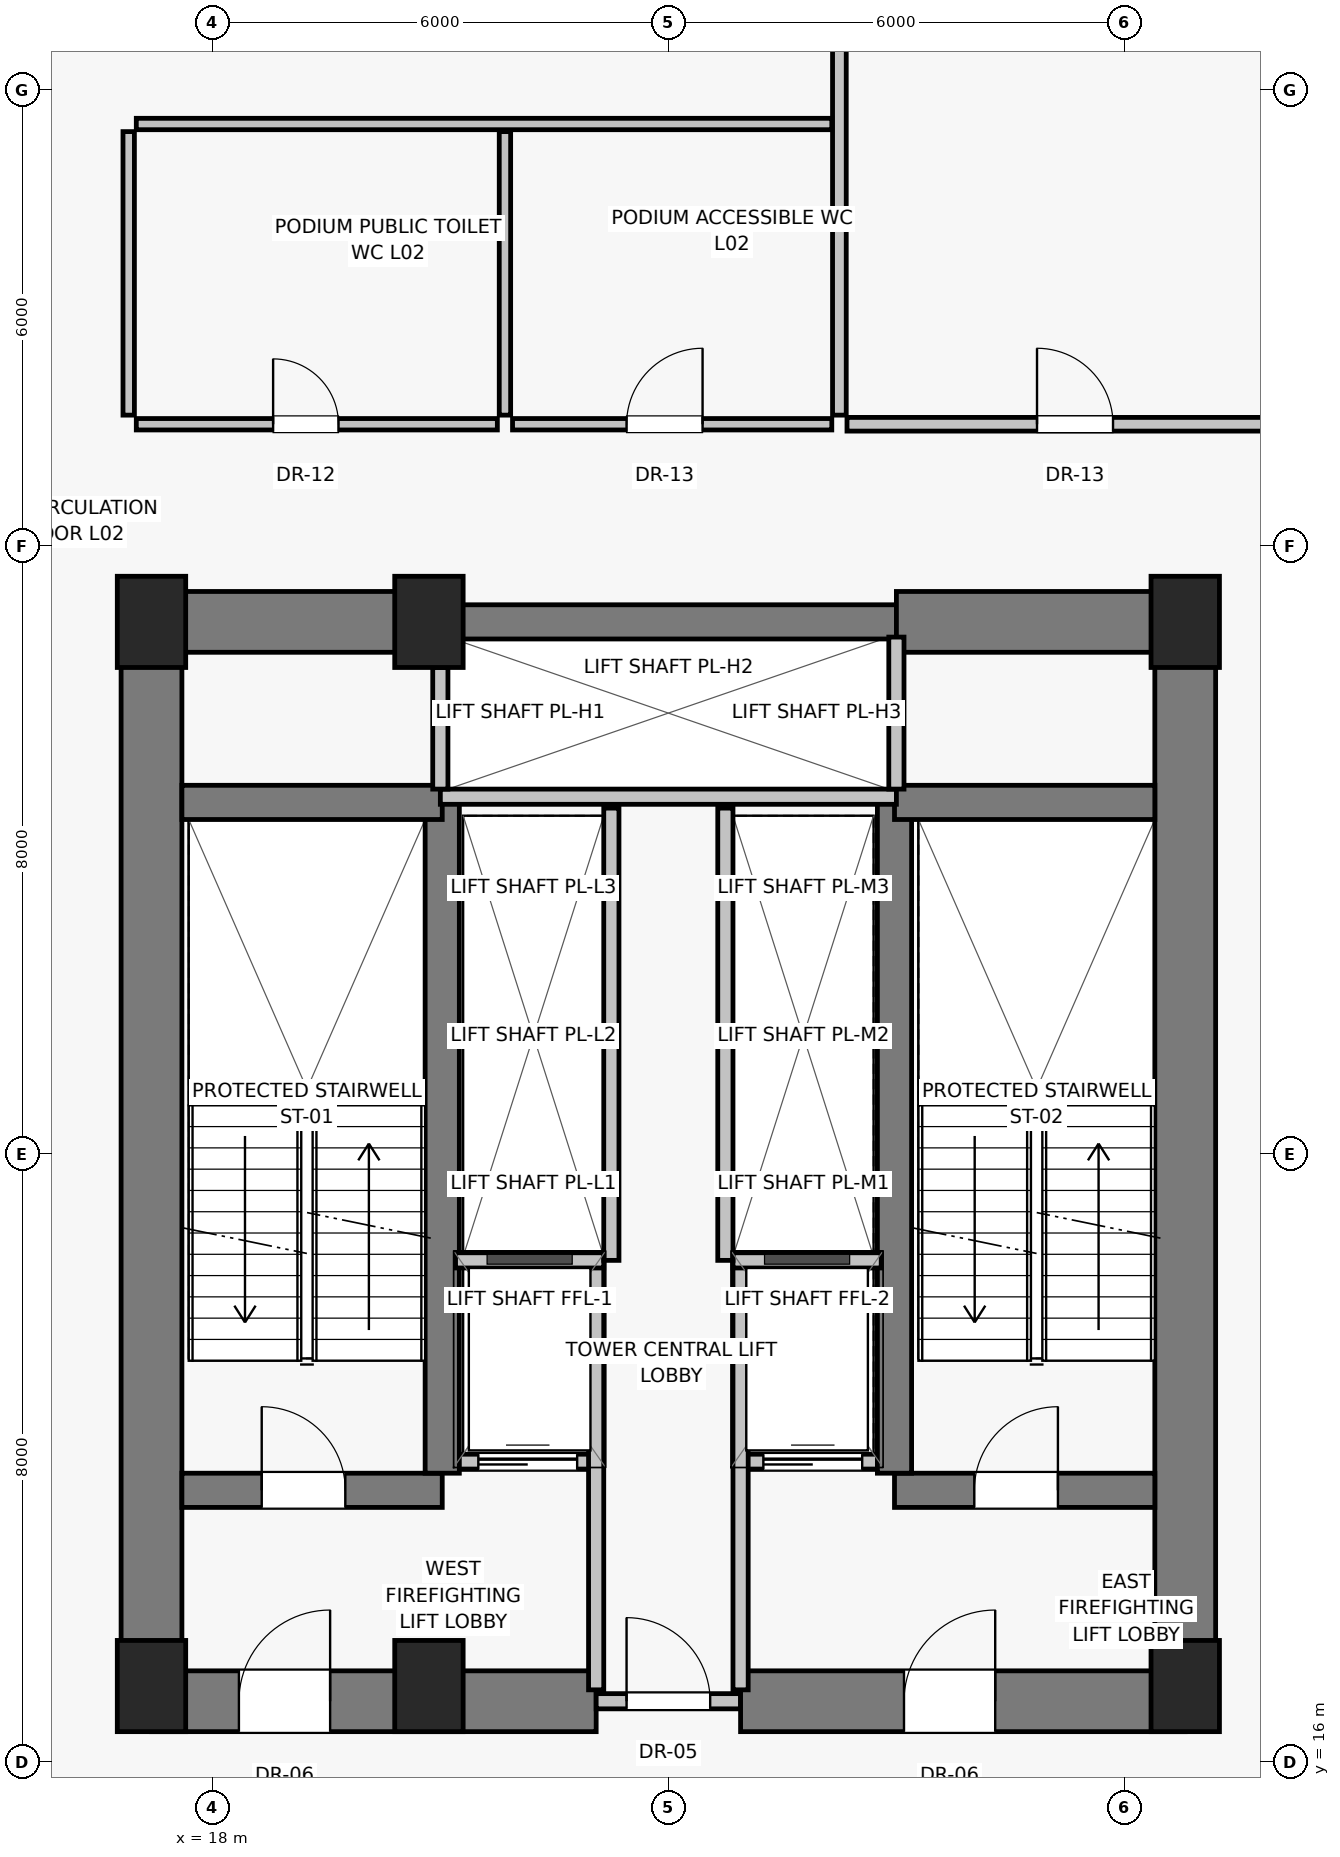
"""IFC4 building model, lengths in metres.
Left out: names, types, materials, properties, quantities, classifications, styles, units other than length and angle.
Written with IfcOpenShell. Run it as: python <this file> out.ifc"""

import sys

from ifc_helpers import new_model, si_unit, direction, frame, frame_2d, origin, origin_2d, place, context, subcontext, project, spatial, rectangle, extrude, source, transform, mapped, element, fill, save


model = new_model("IFC4")
c1 = context("Model", 3, precision=1e-05, world=origin(), true_north=direction((0.0, 1.0)))
c2 = subcontext(c1, "Body", "Model", "MODEL_VIEW")
j1 = project(units=[si_unit("LENGTHUNIT", "METRE"), si_unit("PLANEANGLEUNIT", "RADIAN")], contexts=[c1])
p1 = place(None, origin())
s1 = spatial("IfcSite", under=j1, at=p1, CompositionType="ELEMENT")
p2 = place(p1, origin())
s2 = spatial("IfcBuilding", under=s1, at=p2, CompositionType="ELEMENT")
p3 = place(p2, frame((0.0, 0.0, 9.6)))
s3 = spatial("IfcBuildingStorey", under=s2, at=p3, CompositionType="ELEMENT", Elevation=9.6)
for number, where, z_axis, x_axis in (
    (1, (17.2, 17.0, 0.0), (0.0, 0.0, 1.0), (1.0, 0.0, 0.0)),
    (2, (20.85, 17.0, 0.0), (0.0, 0.0, 1.0), (1.0, 0.0, 0.0)),
    (3, (30.8, 17.0, 0.0), (0.0, 0.0, 1.0), (1.0, 0.0, 0.0)),
    (4, (17.2, 31.0, 0.0), (0.0, 0.0, 1.0), (1.0, 0.0, 0.0)),
    (5, (20.85, 31.0, 0.0), (0.0, 0.0, 1.0), (1.0, 0.0, 0.0)),
    (6, (30.8, 31.0, 0.0), (0.0, 0.0, 1.0), (1.0, 0.0, 0.0)),
):
    element("IfcColumn", number, at=place(p3, frame(where, z_axis=z_axis, x_axis=x_axis)), inside=s3, PredefinedType="PILASTER", context=c2, shape_type="SweptSolid", body=[
        extrude(rectangle(XDim=0.9, YDim=1.2, at=origin_2d()), origin(), (0.0, 0.0, 1.0), 4.4),
    ])
for number, where, z_axis, x_axis in (
    (7, (17.2, 16.8, 0.0), (0.0, 0.0, 1.0), (0.0, 1.0, 0.0)),
    (8, (30.8, 16.8, 0.0), (0.0, 0.0, 1.0), (0.0, 1.0, 0.0)),
):
    element("IfcWall", number, at=place(p3, frame(where, z_axis=z_axis, x_axis=x_axis)), inside=s3, PredefinedType="SHEAR", context=c2, shape_type="SweptSolid", body=[
        extrude(rectangle(XDim=14.2, YDim=0.8, at=frame_2d((7.1, 0.0))), origin(), (0.0, 0.0, 1.0), 4.1),
    ])
p4 = place(p3, frame((17.2, 16.8, 0.0), z_axis=(0.0, 0.0, 1.0), x_axis=(1.0, 0.0, 0.0)))
e9 = element("IfcWall", 9, at=p4, inside=s3, PredefinedType="SHEAR", context=c2, shape_type="SweptSolid", body=[
    extrude(rectangle(XDim=5.85, YDim=0.8, at=frame_2d((2.925, 0.0))), origin(), (0.0, 0.0, 1.0), 4.1),
])
p5 = place(p4, frame((1.15, 0.0, 0.0)))
e10 = element("IfcOpeningElement", 10, at=p5, cuts=e9, PredefinedType="OPENING", context=c2, shape_type="SweptSolid", body=[
    extrude(rectangle(XDim=1.2, YDim=2.03, at=frame_2d((0.6, 1.015))), frame((0.0, 0.41, 0.0), z_axis=(0.0, -1.0, 0.0), x_axis=(1.0, 0.0, 0.0)), (0.0, 0.0, 1.0), 0.82),
])
p6 = place(p3, frame((23.05, 16.8, 0.0), z_axis=(0.0, 0.0, 1.0), x_axis=(1.0, 0.0, 0.0)))
e11 = element("IfcWall", 11, at=p6, inside=s3, PredefinedType="SOLIDWALL", context=c2, shape_type="SweptSolid", body=[
    extrude(rectangle(XDim=1.9, YDim=0.2, at=frame_2d((0.95, 0.0))), origin(), (0.0, 0.0, 1.0), 3.25),
])
p7 = place(p6, frame((0.4, 0.0, 0.0)))
e12 = element("IfcOpeningElement", 12, at=p7, cuts=e11, PredefinedType="OPENING", context=c2, shape_type="SweptSolid", body=[
    extrude(rectangle(XDim=1.1, YDim=2.03, at=frame_2d((0.55, 1.015))), frame((0.0, 0.11, 0.0), z_axis=(0.0, -1.0, 0.0), x_axis=(1.0, 0.0, 0.0)), (0.0, 0.0, 1.0), 0.22),
])
p8 = place(p3, frame((24.95, 16.8, 0.0), z_axis=(0.0, 0.0, 1.0), x_axis=(1.0, 0.0, 0.0)))
e13 = element("IfcWall", 13, at=p8, inside=s3, PredefinedType="SHEAR", context=c2, shape_type="SweptSolid", body=[
    extrude(rectangle(XDim=5.85, YDim=0.8, at=frame_2d((2.925, 0.0))), origin(), (0.0, 0.0, 1.0), 4.1),
])
p9 = place(p8, frame((2.15, 0.0, 0.0)))
e14 = element("IfcOpeningElement", 14, at=p9, cuts=e13, PredefinedType="OPENING", context=c2, shape_type="SweptSolid", body=[
    extrude(rectangle(XDim=1.2, YDim=2.03, at=frame_2d((0.6, 1.015))), frame((0.0, 0.41, 0.0), z_axis=(0.0, -1.0, 0.0), x_axis=(1.0, 0.0, 0.0)), (0.0, 0.0, 1.0), 0.82),
])
p10 = place(p3, frame((17.2, 31.0, 0.0), z_axis=(0.0, 0.0, 1.0), x_axis=(1.0, 0.0, 0.0)))
e15 = element("IfcWall", 15, at=p10, inside=s3, PredefinedType="SHEAR", context=c2, shape_type="SweptSolid", body=[
    extrude(rectangle(XDim=3.8, YDim=0.8, at=frame_2d((1.9, 0.0))), origin(), (0.0, 0.0, 1.0), 4.1),
])
p11 = place(p3, frame((21.0, 31.0, 0.0), z_axis=(0.0, 0.0, 1.0), x_axis=(1.0, 0.0, 0.0)))
e16 = element("IfcWall", 16, at=p11, inside=s3, PredefinedType="SHEAR", context=c2, shape_type="SweptSolid", body=[
    extrude(rectangle(XDim=6.0, YDim=0.45, at=frame_2d((3.0, 0.0))), origin(), (0.0, 0.0, 1.0), 4.1),
])
p12 = place(p3, frame((27.0, 31.0, 0.0), z_axis=(0.0, 0.0, 1.0), x_axis=(1.0, 0.0, 0.0)))
e17 = element("IfcWall", 17, at=p12, inside=s3, PredefinedType="SHEAR", context=c2, shape_type="SweptSolid", body=[
    extrude(rectangle(XDim=3.8, YDim=0.8, at=frame_2d((1.9, 0.0))), origin(), (0.0, 0.0, 1.0), 4.1),
])
p13 = place(p3, frame((17.6, 19.575, 0.0), z_axis=(0.0, 0.0, 1.0), x_axis=(1.0, 0.0, 0.0)))
e18 = element("IfcWall", 18, at=p13, inside=s3, PredefinedType="SHEAR", context=c2, shape_type="SweptSolid", body=[
    extrude(rectangle(XDim=3.425, YDim=0.45, at=frame_2d((1.712, 0.0))), origin(), (0.0, 0.0, 1.0), 4.1),
])
p14 = place(p13, frame((1.05, 0.0, 0.0)))
e19 = element("IfcOpeningElement", 19, at=p14, cuts=e18, PredefinedType="OPENING", context=c2, shape_type="SweptSolid", body=[
    extrude(rectangle(XDim=1.1, YDim=2.03, at=frame_2d((0.55, 1.015))), frame((0.0, 0.235, 0.0), z_axis=(0.0, -1.0, 0.0), x_axis=(1.0, 0.0, 0.0)), (0.0, 0.0, 1.0), 0.47),
])
p15 = place(p3, frame((21.2, 19.95, 0.0), z_axis=(0.0, 0.0, 1.0), x_axis=(1.0, 0.0, 0.0)))
e20 = element("IfcWall", 20, at=p15, inside=s3, PredefinedType="SOLIDWALL", context=c2, shape_type="SweptSolid", body=[
    extrude(rectangle(XDim=1.85, YDim=0.2, at=frame_2d((0.925, 0.0))), origin(), (0.0, 0.0, 1.0), 4.1),
])
p16 = place(p15, frame((0.3, 0.0, 0.0)))
e21 = element("IfcOpeningElement", 21, at=p16, cuts=e20, PredefinedType="OPENING", context=c2, shape_type="SweptSolid", body=[
    extrude(rectangle(XDim=1.3, YDim=2.25, at=frame_2d((0.65, 1.125))), frame((0.0, 0.11, 0.0), z_axis=(0.0, -1.0, 0.0), x_axis=(1.0, 0.0, 0.0)), (0.0, 0.0, 1.0), 0.22),
])
p17 = place(p3, frame((24.95, 19.95, 0.0), z_axis=(0.0, 0.0, 1.0), x_axis=(1.0, 0.0, 0.0)))
e22 = element("IfcWall", 22, at=p17, inside=s3, PredefinedType="SOLIDWALL", context=c2, shape_type="SweptSolid", body=[
    extrude(rectangle(XDim=1.85, YDim=0.2, at=frame_2d((0.925, 0.0))), origin(), (0.0, 0.0, 1.0), 4.1),
])
p18 = place(p17, frame((0.3, 0.0, 0.0)))
e23 = element("IfcOpeningElement", 23, at=p18, cuts=e22, PredefinedType="OPENING", context=c2, shape_type="SweptSolid", body=[
    extrude(rectangle(XDim=1.3, YDim=2.25, at=frame_2d((0.65, 1.125))), frame((0.0, 0.11, 0.0), z_axis=(0.0, -1.0, 0.0), x_axis=(1.0, 0.0, 0.0)), (0.0, 0.0, 1.0), 0.22),
])
p19 = place(p3, frame((26.975, 19.575, 0.0), z_axis=(0.0, 0.0, 1.0), x_axis=(1.0, 0.0, 0.0)))
e24 = element("IfcWall", 24, at=p19, inside=s3, PredefinedType="SHEAR", context=c2, shape_type="SweptSolid", body=[
    extrude(rectangle(XDim=3.425, YDim=0.45, at=frame_2d((1.712, 0.0))), origin(), (0.0, 0.0, 1.0), 4.1),
])
p20 = place(p19, frame((1.05, 0.0, 0.0)))
e25 = element("IfcOpeningElement", 25, at=p20, cuts=e24, PredefinedType="OPENING", context=c2, shape_type="SweptSolid", body=[
    extrude(rectangle(XDim=1.1, YDim=2.03, at=frame_2d((0.55, 1.015))), frame((0.0, 0.235, 0.0), z_axis=(0.0, -1.0, 0.0), x_axis=(1.0, 0.0, 0.0)), (0.0, 0.0, 1.0), 0.47),
])
for number, where, z_axis, x_axis in (
    (26, (21.025, 19.8, 0.0), (0.0, 0.0, 1.0), (0.0, 1.0, 0.0)),
    (27, (26.975, 19.8, 0.0), (0.0, 0.0, 1.0), (0.0, 1.0, 0.0)),
):
    element("IfcWall", number, at=place(p3, frame(where, z_axis=z_axis, x_axis=x_axis)), inside=s3, PredefinedType="SHEAR", context=c2, shape_type="SweptSolid", body=[
        extrude(rectangle(XDim=8.825, YDim=0.45, at=frame_2d((4.413, 0.0))), origin(), (0.0, 0.0, 1.0), 4.1),
    ])
for number, where, z_axis, x_axis in (
    (28, (17.6, 28.625, 0.0), (0.0, 0.0, 1.0), (1.0, 0.0, 0.0)),
    (29, (26.975, 28.625, 0.0), (0.0, 0.0, 1.0), (1.0, 0.0, 0.0)),
):
    element("IfcWall", number, at=place(p3, frame(where, z_axis=z_axis, x_axis=x_axis)), inside=s3, PredefinedType="SHEAR", context=c2, shape_type="SweptSolid", body=[
        extrude(rectangle(XDim=3.425, YDim=0.45, at=frame_2d((1.712, 0.0))), origin(), (0.0, 0.0, 1.0), 4.1),
    ])
for number, where, z_axis, x_axis in (
    (30, (23.05, 16.95, 0.0), (0.0, 0.0, 1.0), (0.0, 1.0, 0.0)),
    (31, (24.95, 16.95, 0.0), (0.0, 0.0, 1.0), (0.0, 1.0, 0.0)),
):
    element("IfcWall", number, at=place(p3, frame(where, z_axis=z_axis, x_axis=x_axis)), inside=s3, PredefinedType="SOLIDWALL", context=c2, shape_type="SweptSolid", body=[
        extrude(rectangle(XDim=5.6, YDim=0.2, at=frame_2d((2.8, 0.0))), origin(), (0.0, 0.0, 1.0), 4.1),
    ])
for number, where, z_axis, x_axis in (
    (32, (21.2, 22.6, 0.0), (0.0, 0.0, 1.0), (1.0, 0.0, 0.0)),
    (33, (24.85, 22.6, 0.0), (0.0, 0.0, 1.0), (1.0, 0.0, 0.0)),
):
    element("IfcWall", number, at=place(p3, frame(where, z_axis=z_axis, x_axis=x_axis)), inside=s3, PredefinedType="SOLIDWALL", context=c2, shape_type="SweptSolid", body=[
        extrude(rectangle(XDim=1.95, YDim=0.2, at=frame_2d((0.975, 0.0))), origin(), (0.0, 0.0, 1.0), 4.1),
    ])
p21 = place(p3, frame((21.0, 28.7, 0.0), z_axis=(0.0, 0.0, 1.0), x_axis=(1.0, 0.0, 0.0)))
e34 = element("IfcWall", 34, at=p21, inside=s3, PredefinedType="SOLIDWALL", context=c2, shape_type="SweptSolid", body=[
    extrude(rectangle(XDim=6.0, YDim=0.2, at=frame_2d((3.0, 0.0))), origin(), (0.0, 0.0, 1.0), 4.1),
])
p22 = place(p3, frame((21.0, 28.8, 0.0), z_axis=(0.0, 0.0, 1.0), x_axis=(0.0, 1.0, 0.0)))
e35 = element("IfcWall", 35, at=p22, inside=s3, PredefinedType="SOLIDWALL", context=c2, shape_type="SweptSolid", body=[
    extrude(rectangle(XDim=1.6, YDim=0.2, at=frame_2d((0.8, 0.0))), origin(), (0.0, 0.0, 1.0), 4.1),
])
p23 = place(p3, frame((27.0, 28.8, 0.0), z_axis=(0.0, 0.0, 1.0), x_axis=(0.0, 1.0, 0.0)))
e36 = element("IfcWall", 36, at=p23, inside=s3, PredefinedType="SOLIDWALL", context=c2, shape_type="SweptSolid", body=[
    extrude(rectangle(XDim=2.0, YDim=0.2, at=frame_2d((1.0, 0.0))), origin(), (0.0, 0.0, 1.0), 4.1),
])
for number, where, z_axis, x_axis in (
    (37, (23.25, 22.6, 0.0), (0.0, 0.0, 1.0), (0.0, 1.0, 0.0)),
    (38, (24.75, 22.6, 0.0), (0.0, 0.0, 1.0), (0.0, 1.0, 0.0)),
):
    element("IfcWall", number, at=place(p3, frame(where, z_axis=z_axis, x_axis=x_axis)), inside=s3, PredefinedType="SOLIDWALL", context=c2, shape_type="SweptSolid", body=[
        extrude(rectangle(XDim=5.95, YDim=0.2, at=frame_2d((2.975, 0.0))), origin(), (0.0, 0.0, 1.0), 4.1),
    ])
p24 = place(p3, frame((17.0, 33.6, 0.0), z_axis=(0.0, 0.0, 1.0), x_axis=(1.0, 0.0, 0.0)))
e39 = element("IfcWall", 39, at=p24, inside=s3, PredefinedType="PARTITIONING", context=c2, shape_type="SweptSolid", body=[
    extrude(rectangle(XDim=4.75, YDim=0.15, at=frame_2d((2.375, 0.0))), origin(), (0.0, 0.0, 1.0), 4.1),
])
p25 = place(p24, frame((1.8, 0.0, 0.0)))
e40 = element("IfcOpeningElement", 40, at=p25, cuts=e39, PredefinedType="OPENING", context=c2, shape_type="SweptSolid", body=[
    extrude(rectangle(XDim=0.86, YDim=2.01, at=frame_2d((0.43, 1.005))), frame((0.0, 0.085, 0.0), z_axis=(0.0, -1.0, 0.0), x_axis=(1.0, 0.0, 0.0)), (0.0, 0.0, 1.0), 0.17),
])
p26 = place(p3, frame((21.95, 33.6, 0.0), z_axis=(0.0, 0.0, 1.0), x_axis=(1.0, 0.0, 0.0)))
e41 = element("IfcWall", 41, at=p26, inside=s3, PredefinedType="PARTITIONING", context=c2, shape_type="SweptSolid", body=[
    extrude(rectangle(XDim=4.2, YDim=0.15, at=frame_2d((2.1, 0.0))), origin(), (0.0, 0.0, 1.0), 4.1),
])
p27 = place(p26, frame((1.5, 0.0, 0.0)))
e42 = element("IfcOpeningElement", 42, at=p27, cuts=e41, PredefinedType="OPENING", context=c2, shape_type="SweptSolid", body=[
    extrude(rectangle(XDim=1.0, YDim=2.01, at=frame_2d((0.5, 1.005))), frame((0.0, 0.085, 0.0), z_axis=(0.0, -1.0, 0.0), x_axis=(1.0, 0.0, 0.0)), (0.0, 0.0, 1.0), 0.17),
])
p28 = place(p3, frame((26.35, 33.6, 0.0), z_axis=(0.0, 0.0, 1.0), x_axis=(1.0, 0.0, 0.0)))
e43 = element("IfcWall", 43, at=p28, inside=s3, PredefinedType="PARTITIONING", context=c2, shape_type="SweptSolid", body=[
    extrude(rectangle(XDim=6.9, YDim=0.18, at=frame_2d((3.45, 0.0))), origin(), (0.0, 0.0, 1.0), 4.1),
])
p29 = place(p28, frame((2.5, 0.0, 0.0)))
e44 = element("IfcOpeningElement", 44, at=p29, cuts=e43, PredefinedType="OPENING", context=c2, shape_type="SweptSolid", body=[
    extrude(rectangle(XDim=1.0, YDim=2.01, at=frame_2d((0.5, 1.005))), frame((0.0, 0.1, 0.0), z_axis=(0.0, -1.0, 0.0), x_axis=(1.0, 0.0, 0.0)), (0.0, 0.0, 1.0), 0.2),
])
for number, where, z_axis, x_axis in (
    (45, (16.9, 33.72, 0.0), (0.0, 0.0, 1.0), (0.0, 1.0, 0.0)),
    (46, (21.85, 33.72, 0.0), (0.0, 0.0, 1.0), (0.0, 1.0, 0.0)),
):
    element("IfcWall", number, at=place(p3, frame(where, z_axis=z_axis, x_axis=x_axis)), inside=s3, PredefinedType="PARTITIONING", context=c2, shape_type="SweptSolid", body=[
        extrude(rectangle(XDim=3.73, YDim=0.15, at=frame_2d((1.865, 0.0))), origin(), (0.0, 0.0, 1.0), 4.1),
    ])
p30 = place(p3, frame((26.25, 33.72, 0.0), z_axis=(0.0, 0.0, 1.0), x_axis=(0.0, 1.0, 0.0)))
e47 = element("IfcWall", 47, at=p30, inside=s3, PredefinedType="PARTITIONING", context=c2, shape_type="SweptSolid", body=[
    extrude(rectangle(XDim=12.06, YDim=0.18, at=frame_2d((6.03, 0.0))), origin(), (0.0, 0.0, 1.0), 4.1),
])
p31 = place(p3, frame((17.0, 37.55, 0.0), z_axis=(0.0, 0.0, 1.0), x_axis=(1.0, 0.0, 0.0)))
e48 = element("IfcWall", 48, at=p31, inside=s3, PredefinedType="PARTITIONING", context=c2, shape_type="SweptSolid", body=[
    extrude(rectangle(XDim=9.15, YDim=0.15, at=frame_2d((4.575, 0.0))), origin(), (0.0, 0.0, 1.0), 4.1),
])
m1 = source(origin(), c2, "Body", "SweptSolid", [
    extrude(rectangle(XDim=1.2, YDim=2.03, at=frame_2d((0.6, 1.015))), frame((0.0, 0.025, 0.0), z_axis=(0.0, -1.0, 0.0), x_axis=(1.0, 0.0, 0.0)), (0.0, 0.0, 1.0), 0.05),
])
p32 = place(p5, origin())
e49 = element("IfcDoor", 49, at=p32, inside=s3, OperationType="SINGLE_SWING_RIGHT", PredefinedType="DOOR", context=c2, shape_type="MappedRepresentation", body=[
    mapped(m1, transform((0.0, 0.0, 0.0), scale=1.0)),
])
fill(e10, e49)
m2 = source(origin(), c2, "Body", "SweptSolid", [
    extrude(rectangle(XDim=1.1, YDim=2.03, at=frame_2d((0.55, 1.015))), frame((0.0, 0.025, 0.0), z_axis=(0.0, -1.0, 0.0), x_axis=(1.0, 0.0, 0.0)), (0.0, 0.0, 1.0), 0.05),
])
p33 = place(p7, origin())
e50 = element("IfcDoor", 50, at=p33, inside=s3, OperationType="SINGLE_SWING_LEFT", PredefinedType="DOOR", context=c2, shape_type="MappedRepresentation", body=[
    mapped(m2, transform((0.0, 0.0, 0.0), scale=1.0)),
])
fill(e12, e50)
p34 = place(p9, origin())
e51 = element("IfcDoor", 51, at=p34, inside=s3, OperationType="SINGLE_SWING_RIGHT", PredefinedType="DOOR", context=c2, shape_type="MappedRepresentation", body=[
    mapped(m1, transform((0.0, 0.0, 0.0), scale=1.0)),
])
fill(e14, e51)
p35 = place(p14, origin())
e52 = element("IfcDoor", 52, at=p35, inside=s3, OperationType="SINGLE_SWING_LEFT", PredefinedType="DOOR", context=c2, shape_type="MappedRepresentation", body=[
    mapped(m2, transform((0.0, 0.0, 0.0), scale=1.0)),
])
fill(e19, e52)
m3 = source(origin(), c2, "Body", "SweptSolid", [
    extrude(rectangle(XDim=1.3, YDim=2.25, at=frame_2d((0.65, 1.125))), frame((0.0, 0.025, 0.0), z_axis=(0.0, -1.0, 0.0), x_axis=(1.0, 0.0, 0.0)), (0.0, 0.0, 1.0), 0.05),
])
p36 = place(p16, origin())
e53 = element("IfcDoor", 53, at=p36, inside=s3, OperationType="SLIDING_TO_LEFT", PredefinedType="DOOR", context=c2, shape_type="MappedRepresentation", body=[
    mapped(m3, transform((0.0, 0.0, 0.0), scale=1.0)),
])
fill(e21, e53)
p37 = place(p18, origin())
e54 = element("IfcDoor", 54, at=p37, inside=s3, OperationType="SLIDING_TO_LEFT", PredefinedType="DOOR", context=c2, shape_type="MappedRepresentation", body=[
    mapped(m3, transform((0.0, 0.0, 0.0), scale=1.0)),
])
fill(e23, e54)
p38 = place(p20, origin())
e55 = element("IfcDoor", 55, at=p38, inside=s3, OperationType="SINGLE_SWING_RIGHT", PredefinedType="DOOR", context=c2, shape_type="MappedRepresentation", body=[
    mapped(m2, transform((0.0, 0.0, 0.0), scale=1.0)),
])
fill(e25, e55)
m4 = source(origin(), c2, "Body", "SweptSolid", [
    extrude(rectangle(XDim=0.86, YDim=2.01, at=frame_2d((0.43, 1.005))), frame((0.0, 0.025, 0.0), z_axis=(0.0, -1.0, 0.0), x_axis=(1.0, 0.0, 0.0)), (0.0, 0.0, 1.0), 0.05),
])
p39 = place(p25, origin())
e56 = element("IfcDoor", 56, at=p39, inside=s3, OperationType="SINGLE_SWING_LEFT", PredefinedType="DOOR", context=c2, shape_type="MappedRepresentation", body=[
    mapped(m4, transform((0.0, 0.0, 0.0), scale=1.0)),
])
fill(e40, e56)
m5 = source(origin(), c2, "Body", "SweptSolid", [
    extrude(rectangle(XDim=1.0, YDim=2.01, at=frame_2d((0.5, 1.005))), frame((0.0, 0.025, 0.0), z_axis=(0.0, -1.0, 0.0), x_axis=(1.0, 0.0, 0.0)), (0.0, 0.0, 1.0), 0.05),
])
p40 = place(p27, origin())
e57 = element("IfcDoor", 57, at=p40, inside=s3, OperationType="SINGLE_SWING_RIGHT", PredefinedType="DOOR", context=c2, shape_type="MappedRepresentation", body=[
    mapped(m5, transform((0.0, 0.0, 0.0), scale=1.0)),
])
fill(e42, e57)
p41 = place(p29, origin())
e58 = element("IfcDoor", 58, at=p41, inside=s3, OperationType="SINGLE_SWING_LEFT", PredefinedType="DOOR", context=c2, shape_type="MappedRepresentation", body=[
    mapped(m5, transform((0.0, 0.0, 0.0), scale=1.0)),
])
fill(e44, e58)
save(model, sys.argv[1])
